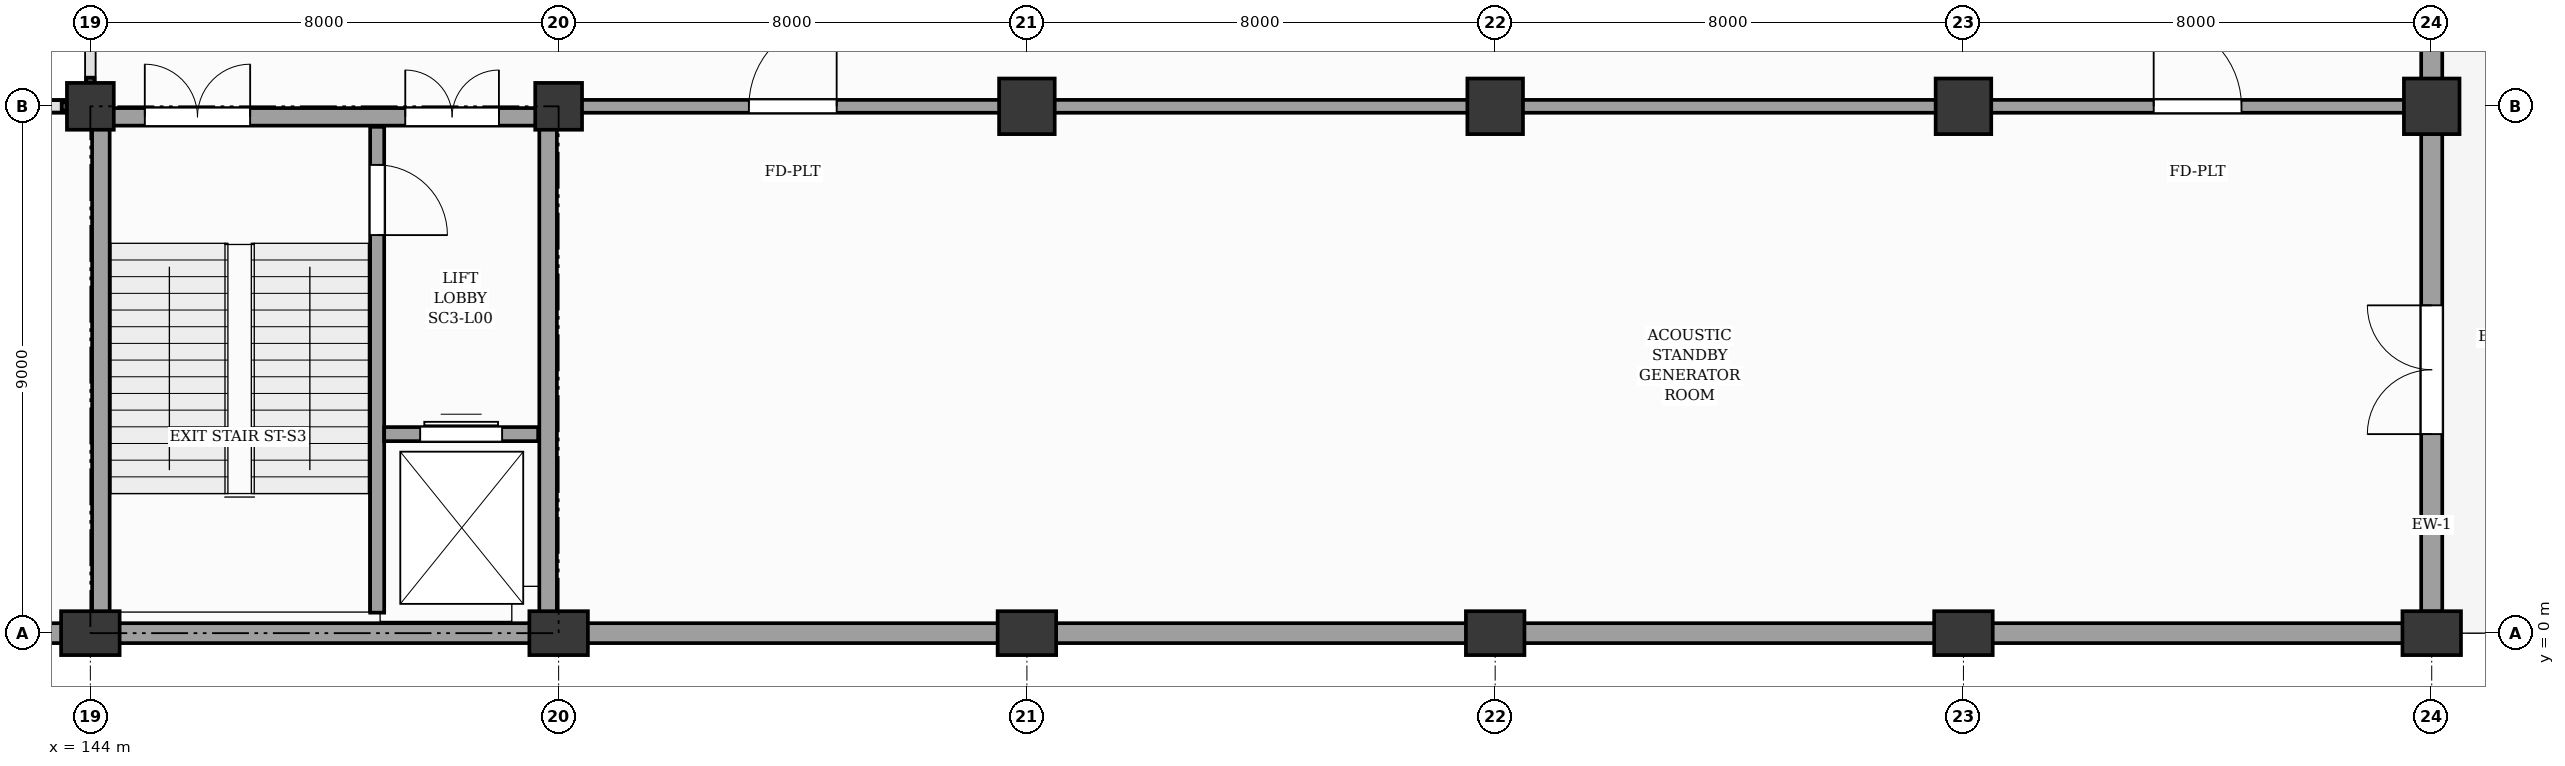
"""IFC4 building model, lengths in metres.
Left out: names, types, materials, properties, quantities, classifications, styles, units other than length and angle.
Written with IfcOpenShell. Run it as: python <this file> out.ifc"""

import sys

from ifc_helpers import new_model, si_unit, direction, frame, frame_2d, origin, origin_2d, place, context, subcontext, project, spatial, rectangle, extrude, element, fill, save


model = new_model("IFC4")
c1 = context("Model", 3, precision=1e-05, world=origin(), true_north=direction((0.0, 1.0)))
c2 = subcontext(c1, "Body", "Model", "MODEL_VIEW")
j1 = project(units=[si_unit("LENGTHUNIT", "METRE"), si_unit("PLANEANGLEUNIT", "RADIAN")], contexts=[c1])
p1 = place(None, origin())
s1 = spatial("IfcSite", under=j1, at=p1, CompositionType="ELEMENT")
p2 = place(p1, origin())
s2 = spatial("IfcBuilding", under=s1, at=p2, CompositionType="ELEMENT")
p3 = place(p2, origin())
s3 = spatial("IfcBuildingStorey", under=s2, at=p3, CompositionType="ELEMENT", Elevation=0.0)
p4 = place(p3, frame((144.0, 0.0, -0.3), z_axis=(0.0, 0.0, 1.0), x_axis=(1.0, 0.0, 0.0)))
e1 = element("IfcColumn", 1, at=p4, inside=s3, PredefinedType="PILASTER", context=c2, shape_type="SweptSolid", body=[
    extrude(rectangle(XDim=1.0, YDim=0.75, at=origin_2d()), origin(), (0.0, 0.0, 1.0), 5.1),
])
p5 = place(p3, frame((144.0, 9.0, -0.3), z_axis=(0.0, 0.0, 1.0), x_axis=(1.0, 0.0, 0.0)))
e2 = element("IfcColumn", 2, at=p5, inside=s3, PredefinedType="COLUMN", context=c2, shape_type="SweptSolid", body=[
    extrude(rectangle(XDim=0.8, YDim=0.8, at=origin_2d()), origin(), (0.0, 0.0, 1.0), 5.1),
])
p6 = place(p3, frame((152.0, 0.0, -0.3), z_axis=(0.0, 0.0, 1.0), x_axis=(1.0, 0.0, 0.0)))
e3 = element("IfcColumn", 3, at=p6, inside=s3, PredefinedType="PILASTER", context=c2, shape_type="SweptSolid", body=[
    extrude(rectangle(XDim=1.0, YDim=0.75, at=origin_2d()), origin(), (0.0, 0.0, 1.0), 5.1),
])
p7 = place(p3, frame((152.0, 9.0, -0.3), z_axis=(0.0, 0.0, 1.0), x_axis=(1.0, 0.0, 0.0)))
e4 = element("IfcColumn", 4, at=p7, inside=s3, PredefinedType="COLUMN", context=c2, shape_type="SweptSolid", body=[
    extrude(rectangle(XDim=0.8, YDim=0.8, at=origin_2d()), origin(), (0.0, 0.0, 1.0), 5.1),
])
p8 = place(p3, frame((160.0, 0.0, -0.3), z_axis=(0.0, 0.0, 1.0), x_axis=(1.0, 0.0, 0.0)))
e5 = element("IfcColumn", 5, at=p8, inside=s3, PredefinedType="PILASTER", context=c2, shape_type="SweptSolid", body=[
    extrude(rectangle(XDim=1.0, YDim=0.75, at=origin_2d()), origin(), (0.0, 0.0, 1.0), 5.1),
])
p9 = place(p3, frame((160.0, 9.0, -0.3), z_axis=(0.0, 0.0, 1.0), x_axis=(1.0, 0.0, 0.0)))
e6 = element("IfcColumn", 6, at=p9, inside=s3, PredefinedType="COLUMN", context=c2, shape_type="SweptSolid", body=[
    extrude(rectangle(XDim=0.95, YDim=0.95, at=origin_2d()), origin(), (0.0, 0.0, 1.0), 5.1),
])
p10 = place(p3, frame((168.0, 0.0, -0.3), z_axis=(0.0, 0.0, 1.0), x_axis=(1.0, 0.0, 0.0)))
e7 = element("IfcColumn", 7, at=p10, inside=s3, PredefinedType="PILASTER", context=c2, shape_type="SweptSolid", body=[
    extrude(rectangle(XDim=1.0, YDim=0.75, at=origin_2d()), origin(), (0.0, 0.0, 1.0), 5.1),
])
p11 = place(p3, frame((168.0, 9.0, -0.3), z_axis=(0.0, 0.0, 1.0), x_axis=(1.0, 0.0, 0.0)))
e8 = element("IfcColumn", 8, at=p11, inside=s3, PredefinedType="COLUMN", context=c2, shape_type="SweptSolid", body=[
    extrude(rectangle(XDim=0.95, YDim=0.95, at=origin_2d()), origin(), (0.0, 0.0, 1.0), 5.1),
])
p12 = place(p3, frame((176.0, 0.0, -0.3), z_axis=(0.0, 0.0, 1.0), x_axis=(1.0, 0.0, 0.0)))
e9 = element("IfcColumn", 9, at=p12, inside=s3, PredefinedType="PILASTER", context=c2, shape_type="SweptSolid", body=[
    extrude(rectangle(XDim=1.0, YDim=0.75, at=origin_2d()), origin(), (0.0, 0.0, 1.0), 5.1),
])
p13 = place(p3, frame((176.0, 9.0, -0.3), z_axis=(0.0, 0.0, 1.0), x_axis=(1.0, 0.0, 0.0)))
e10 = element("IfcColumn", 10, at=p13, inside=s3, PredefinedType="COLUMN", context=c2, shape_type="SweptSolid", body=[
    extrude(rectangle(XDim=0.95, YDim=0.95, at=origin_2d()), origin(), (0.0, 0.0, 1.0), 5.1),
])
p14 = place(p3, frame((184.0, 0.0, -0.3), z_axis=(0.0, 0.0, 1.0), x_axis=(1.0, 0.0, 0.0)))
e11 = element("IfcColumn", 11, at=p14, inside=s3, PredefinedType="PILASTER", context=c2, shape_type="SweptSolid", body=[
    extrude(rectangle(XDim=1.0, YDim=0.75, at=origin_2d()), origin(), (0.0, 0.0, 1.0), 5.1),
])
p15 = place(p3, frame((184.0, 9.0, -0.3), z_axis=(0.0, 0.0, 1.0), x_axis=(1.0, 0.0, 0.0)))
e12 = element("IfcColumn", 12, at=p15, inside=s3, PredefinedType="COLUMN", context=c2, shape_type="SweptSolid", body=[
    extrude(rectangle(XDim=0.95, YDim=0.95, at=origin_2d()), origin(), (0.0, 0.0, 1.0), 5.1),
])
p16 = place(p3, frame((136.4, 0.0, 0.0), z_axis=(0.0, 0.0, 1.0), x_axis=(1.0, 0.0, 0.0)))
e13 = element("IfcWall", 13, at=p16, inside=s3, PredefinedType="SOLIDWALL", context=c2, shape_type="SweptSolid", body=[
    extrude(rectangle(XDim=7.2, YDim=0.34, at=frame_2d((3.6, 0.0))), origin(), (0.0, 0.0, 1.0), 3.81),
])
for number, where, z_axis, x_axis in (
    (14, (144.4, 0.0, 0.0), (0.0, 0.0, 1.0), (1.0, 0.0, 0.0)),
    (15, (152.4, 0.0, 0.0), (0.0, 0.0, 1.0), (1.0, 0.0, 0.0)),
    (16, (160.4, 0.0, 0.0), (0.0, 0.0, 1.0), (1.0, 0.0, 0.0)),
    (17, (168.4, 0.0, 0.0), (0.0, 0.0, 1.0), (1.0, 0.0, 0.0)),
    (18, (176.4, 0.0, 0.0), (0.0, 0.0, 1.0), (1.0, 0.0, 0.0)),
):
    element("IfcWall", number, at=place(p3, frame(where, z_axis=z_axis, x_axis=x_axis)), inside=s3, PredefinedType="SOLIDWALL", context=c2, shape_type="SweptSolid", body=[
        extrude(rectangle(XDim=7.2, YDim=0.34, at=frame_2d((3.6, 0.0))), origin(), (0.0, 0.0, 1.0), 3.84),
    ])
p17 = place(p3, frame((184.0, 0.37, 0.0), z_axis=(0.0, 0.0, 1.0), x_axis=(0.0, 1.0, 0.0)))
e19 = element("IfcWall", 19, at=p17, inside=s3, PredefinedType="SOLIDWALL", context=c2, shape_type="SweptSolid", body=[
    extrude(rectangle(XDim=8.23, YDim=0.36, at=frame_2d((4.115, 0.0))), origin(), (0.0, 0.0, 1.0), 3.56),
])
p18 = place(p17, frame((3.03, 0.0, 0.0)))
e20 = element("IfcOpeningElement", 20, at=p18, cuts=e19, PredefinedType="OPENING", context=c2, shape_type="SweptSolid", body=[
    extrude(rectangle(XDim=2.2, YDim=2.3, at=frame_2d((1.1, 1.15))), frame((0.0, 0.19, 0.0), z_axis=(0.0, -1.0, 0.0), x_axis=(1.0, 0.0, 0.0)), (0.0, 0.0, 1.0), 0.38),
])
p19 = place(p3, frame((184.0, 9.4, 0.0), z_axis=(0.0, 0.0, 1.0), x_axis=(0.0, 1.0, 0.0)))
e21 = element("IfcWall", 21, at=p19, inside=s3, PredefinedType="SOLIDWALL", context=c2, shape_type="SweptSolid", body=[
    extrude(rectangle(XDim=8.2, YDim=0.36, at=frame_2d((4.1, 0.0))), origin(), (0.0, 0.0, 1.0), 3.41),
])
p20 = place(p19, frame((2.9, 0.0, 0.0)))
e22 = element("IfcOpeningElement", 22, at=p20, cuts=e21, PredefinedType="OPENING", context=c2, shape_type="SweptSolid", body=[
    extrude(rectangle(XDim=2.4, YDim=2.35, at=frame_2d((1.2, 1.175))), frame((0.0, 0.19, 0.0), z_axis=(0.0, -1.0, 0.0), x_axis=(1.0, 0.0, 0.0)), (0.0, 0.0, 1.0), 0.38),
])
p21 = place(p3, frame((148.9, 0.35, 0.0), z_axis=(0.0, 0.0, 1.0), x_axis=(0.0, 1.0, 0.0)))
e23 = element("IfcWall", 23, at=p21, inside=s3, PredefinedType="SHEAR", context=c2, shape_type="SweptSolid", body=[
    extrude(rectangle(XDim=8.3, YDim=0.24, at=frame_2d((4.15, 0.0))), origin(), (0.0, 0.0, 1.0), 4.52),
])
p22 = place(p21, frame((6.45, 0.0, 0.0)))
e24 = element("IfcOpeningElement", 24, at=p22, cuts=e23, PredefinedType="OPENING", context=c2, shape_type="SweptSolid", body=[
    extrude(rectangle(XDim=1.2, YDim=2.15, at=frame_2d((0.6, 1.075))), frame((0.0, 0.13, 0.0), z_axis=(0.0, -1.0, 0.0), x_axis=(1.0, 0.0, 0.0)), (0.0, 0.0, 1.0), 0.26),
])
p23 = place(p3, frame((149.02, 3.4, 0.0), z_axis=(0.0, 0.0, 1.0), x_axis=(1.0, 0.0, 0.0)))
e25 = element("IfcWall", 25, at=p23, inside=s3, PredefinedType="SHEAR", context=c2, shape_type="SweptSolid", body=[
    extrude(rectangle(XDim=2.63, YDim=0.24, at=frame_2d((1.315, 0.0))), origin(), (0.0, 0.0, 1.0), 4.52),
])
p24 = place(p23, frame((0.615, 0.0, 0.0)))
e26 = element("IfcOpeningElement", 26, at=p24, cuts=e25, PredefinedType="OPENING", context=c2, shape_type="SweptSolid", body=[
    extrude(rectangle(XDim=1.4, YDim=2.15, at=frame_2d((0.7, 1.075))), frame((0.0, 0.13, 0.0), z_axis=(0.0, -1.0, 0.0), x_axis=(1.0, 0.0, 0.0)), (0.0, 0.0, 1.0), 0.26),
])
for number, where, z_axis, x_axis in (
    (27, (144.18, 0.18, 0.0), (0.0, 0.0, 1.0), (0.0, 1.0, 0.0)),
    (28, (151.82, 0.18, 0.0), (0.0, 0.0, 1.0), (0.0, 1.0, 0.0)),
):
    element("IfcWall", number, at=place(p3, frame(where, z_axis=z_axis, x_axis=x_axis)), inside=s3, PredefinedType="SHEAR", context=c2, shape_type="SweptSolid", body=[
        extrude(rectangle(XDim=8.64, YDim=0.3, at=frame_2d((4.32, 0.0))), origin(), (0.0, 0.0, 1.0), 4.52),
    ])
p25 = place(p3, frame((144.03, 8.82, 0.0), z_axis=(0.0, 0.0, 1.0), x_axis=(1.0, 0.0, 0.0)))
e29 = element("IfcWall", 29, at=p25, inside=s3, PredefinedType="SHEAR", context=c2, shape_type="SweptSolid", body=[
    extrude(rectangle(XDim=7.94, YDim=0.3, at=frame_2d((3.97, 0.0))), origin(), (0.0, 0.0, 1.0), 4.52),
])
p26 = place(p25, frame((5.35, 0.0, 0.0)))
e30 = element("IfcOpeningElement", 30, at=p26, cuts=e29, PredefinedType="OPENING", context=c2, shape_type="SweptSolid", body=[
    extrude(rectangle(XDim=1.6, YDim=2.15, at=frame_2d((0.8, 1.075))), frame((0.0, 0.16, 0.0), z_axis=(0.0, -1.0, 0.0), x_axis=(1.0, 0.0, 0.0)), (0.0, 0.0, 1.0), 0.32),
])
p27 = place(p25, frame((0.9, 0.0, 0.0)))
e31 = element("IfcOpeningElement", 31, at=p27, cuts=e29, PredefinedType="OPENING", context=c2, shape_type="SweptSolid", body=[
    extrude(rectangle(XDim=1.8, YDim=2.2, at=frame_2d((0.9, 1.1))), frame((0.0, 0.16, 0.0), z_axis=(0.0, -1.0, 0.0), x_axis=(1.0, 0.0, 0.0)), (0.0, 0.0, 1.0), 0.32),
])
p28 = place(p3, frame((136.3, 9.0, 0.0), z_axis=(0.0, 0.0, 1.0), x_axis=(1.0, 0.0, 0.0)))
e32 = element("IfcWall", 32, at=p28, inside=s3, PredefinedType="SOLIDWALL", context=c2, shape_type="SweptSolid", body=[
    extrude(rectangle(XDim=7.4, YDim=0.22, at=frame_2d((3.7, 0.0))), origin(), (0.0, 0.0, 1.0), 3.56),
])
p29 = place(p28, frame((2.95, 0.0, 0.0)))
e33 = element("IfcOpeningElement", 33, at=p29, cuts=e32, PredefinedType="OPENING", context=c2, shape_type="SweptSolid", body=[
    extrude(rectangle(XDim=1.5, YDim=2.2, at=frame_2d((0.75, 1.1))), frame((0.0, 0.12, 0.0), z_axis=(0.0, -1.0, 0.0), x_axis=(1.0, 0.0, 0.0)), (0.0, 0.0, 1.0), 0.24),
])
p30 = place(p3, frame((152.3, 9.0, 0.0), z_axis=(0.0, 0.0, 1.0), x_axis=(1.0, 0.0, 0.0)))
e34 = element("IfcWall", 34, at=p30, inside=s3, PredefinedType="SOLIDWALL", context=c2, shape_type="SweptSolid", body=[
    extrude(rectangle(XDim=7.4, YDim=0.22, at=frame_2d((3.7, 0.0))), origin(), (0.0, 0.0, 1.0), 3.56),
])
p31 = place(p30, frame((2.95, 0.0, 0.0)))
e35 = element("IfcOpeningElement", 35, at=p31, cuts=e34, PredefinedType="OPENING", context=c2, shape_type="SweptSolid", body=[
    extrude(rectangle(XDim=1.5, YDim=2.2, at=frame_2d((0.75, 1.1))), frame((0.0, 0.12, 0.0), z_axis=(0.0, -1.0, 0.0), x_axis=(1.0, 0.0, 0.0)), (0.0, 0.0, 1.0), 0.24),
])
for number, where, z_axis, x_axis in (
    (36, (160.3, 9.0, 0.0), (0.0, 0.0, 1.0), (1.0, 0.0, 0.0)),
    (37, (168.3, 9.0, 0.0), (0.0, 0.0, 1.0), (1.0, 0.0, 0.0)),
):
    element("IfcWall", number, at=place(p3, frame(where, z_axis=z_axis, x_axis=x_axis)), inside=s3, PredefinedType="SOLIDWALL", context=c2, shape_type="SweptSolid", body=[
        extrude(rectangle(XDim=7.4, YDim=0.22, at=frame_2d((3.7, 0.0))), origin(), (0.0, 0.0, 1.0), 3.56),
    ])
p32 = place(p3, frame((176.3, 9.0, 0.0), z_axis=(0.0, 0.0, 1.0), x_axis=(1.0, 0.0, 0.0)))
e38 = element("IfcWall", 38, at=p32, inside=s3, PredefinedType="SOLIDWALL", context=c2, shape_type="SweptSolid", body=[
    extrude(rectangle(XDim=7.4, YDim=0.22, at=frame_2d((3.7, 0.0))), origin(), (0.0, 0.0, 1.0), 3.56),
])
p33 = place(p32, frame((2.95, 0.0, 0.0)))
e39 = element("IfcOpeningElement", 39, at=p33, cuts=e38, PredefinedType="OPENING", context=c2, shape_type="SweptSolid", body=[
    extrude(rectangle(XDim=1.5, YDim=2.2, at=frame_2d((0.75, 1.1))), frame((0.0, 0.12, 0.0), z_axis=(0.0, -1.0, 0.0), x_axis=(1.0, 0.0, 0.0)), (0.0, 0.0, 1.0), 0.24),
])
p34 = place(p18, origin())
e40 = element("IfcDoor", 40, at=p34, inside=s3, OperationType="DOUBLE_DOOR_SINGLE_SWING", PredefinedType="DOOR", context=c2, shape_type="SweptSolid", body=[
    extrude(rectangle(XDim=2.2, YDim=2.3, at=frame_2d((1.1, 1.15))), frame((0.0, 0.025, 0.0), z_axis=(0.0, -1.0, 0.0), x_axis=(1.0, 0.0, 0.0)), (0.0, 0.0, 1.0), 0.05),
])
fill(e20, e40)
p35 = place(p22, frame((1.2, 0.0, 0.0), z_axis=(0.0, 0.0, 1.0), x_axis=(-1.0, 0.0, 0.0)))
e41 = element("IfcDoor", 41, at=p35, inside=s3, OperationType="SINGLE_SWING_LEFT", PredefinedType="DOOR", context=c2, shape_type="SweptSolid", body=[
    extrude(rectangle(XDim=1.2, YDim=2.15, at=frame_2d((0.6, 1.075))), frame((0.0, 0.025, 0.0), z_axis=(0.0, -1.0, 0.0), x_axis=(1.0, 0.0, 0.0)), (0.0, 0.0, 1.0), 0.05),
])
fill(e24, e41)
p36 = place(p24, origin())
e42 = element("IfcDoor", 42, at=p36, inside=s3, OperationType="DOUBLE_DOOR_SLIDING", PredefinedType="DOOR", context=c2, shape_type="SweptSolid", body=[
    extrude(rectangle(XDim=1.4, YDim=2.15, at=frame_2d((0.7, 1.075))), frame((0.0, 0.025, 0.0), z_axis=(0.0, -1.0, 0.0), x_axis=(1.0, 0.0, 0.0)), (0.0, 0.0, 1.0), 0.05),
])
fill(e26, e42)
p37 = place(p26, origin())
e43 = element("IfcDoor", 43, at=p37, inside=s3, OperationType="DOUBLE_DOOR_SINGLE_SWING", PredefinedType="DOOR", context=c2, shape_type="SweptSolid", body=[
    extrude(rectangle(XDim=1.6, YDim=2.15, at=frame_2d((0.8, 1.075))), frame((0.0, 0.025, 0.0), z_axis=(0.0, -1.0, 0.0), x_axis=(1.0, 0.0, 0.0)), (0.0, 0.0, 1.0), 0.05),
])
fill(e30, e43)
p38 = place(p27, origin())
e44 = element("IfcDoor", 44, at=p38, inside=s3, OperationType="DOUBLE_DOOR_SINGLE_SWING", PredefinedType="DOOR", context=c2, shape_type="SweptSolid", body=[
    extrude(rectangle(XDim=1.8, YDim=2.2, at=frame_2d((0.9, 1.1))), frame((0.0, 0.025, 0.0), z_axis=(0.0, -1.0, 0.0), x_axis=(1.0, 0.0, 0.0)), (0.0, 0.0, 1.0), 0.05),
])
fill(e31, e44)
p39 = place(p31, origin())
e45 = element("IfcDoor", 45, at=p39, inside=s3, OperationType="SINGLE_SWING_RIGHT", PredefinedType="DOOR", context=c2, shape_type="SweptSolid", body=[
    extrude(rectangle(XDim=1.5, YDim=2.2, at=frame_2d((0.75, 1.1))), frame((0.0, 0.025, 0.0), z_axis=(0.0, -1.0, 0.0), x_axis=(1.0, 0.0, 0.0)), (0.0, 0.0, 1.0), 0.05),
])
fill(e35, e45)
p40 = place(p33, origin())
e46 = element("IfcDoor", 46, at=p40, inside=s3, OperationType="SINGLE_SWING_LEFT", PredefinedType="DOOR", context=c2, shape_type="SweptSolid", body=[
    extrude(rectangle(XDim=1.5, YDim=2.2, at=frame_2d((0.75, 1.1))), frame((0.0, 0.025, 0.0), z_axis=(0.0, -1.0, 0.0), x_axis=(1.0, 0.0, 0.0)), (0.0, 0.0, 1.0), 0.05),
])
fill(e39, e46)
save(model, sys.argv[1])
